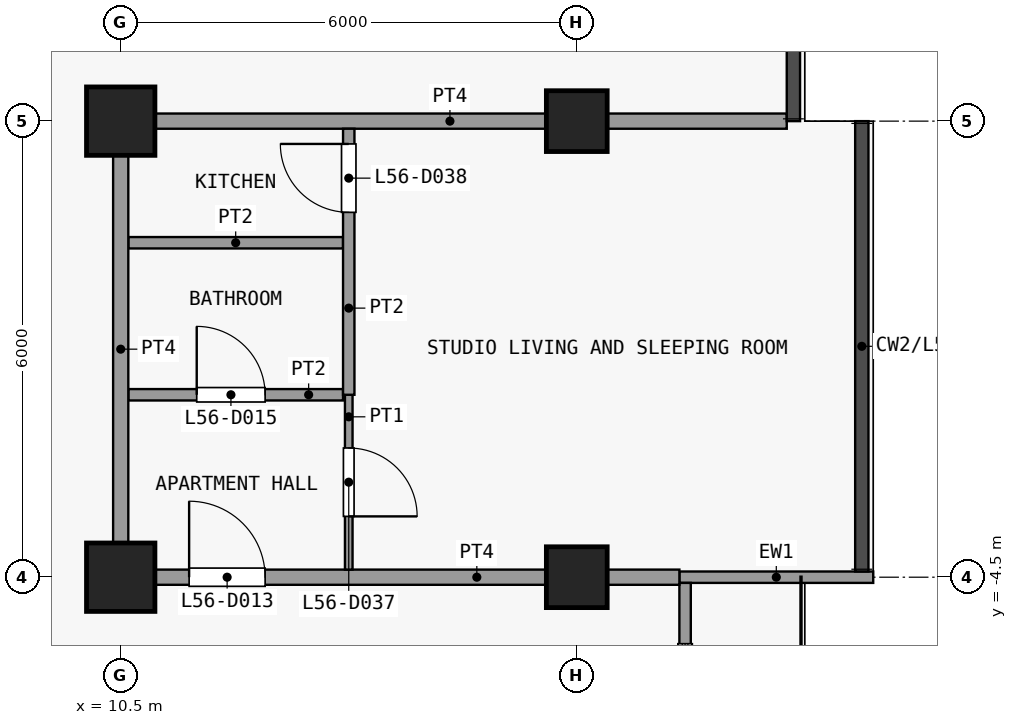
"""IFC4 building model, lengths in metres.
Left out: names, types, materials, properties, quantities, classifications, styles, units other than length and angle.
Written with IfcOpenShell. Run it as: python <this file> out.ifc"""

import sys

from ifc_helpers import new_model, si_unit, direction, frame, frame_2d, origin, origin_2d, place, context, subcontext, project, spatial, rectangle, extrude, element, fill, save


model = new_model("IFC4")
c1 = context("Model", 3, precision=1e-05, world=origin(), true_north=direction((0.0, 1.0)))
c2 = subcontext(c1, "Body", "Model", "MODEL_VIEW")
j1 = project(units=[si_unit("LENGTHUNIT", "METRE"), si_unit("PLANEANGLEUNIT", "RADIAN")], contexts=[c1])
p1 = place(None, origin())
s1 = spatial("IfcSite", under=j1, at=p1, CompositionType="ELEMENT")
p2 = place(p1, origin())
s2 = spatial("IfcBuilding", under=s1, at=p2, CompositionType="ELEMENT")
p3 = place(p2, frame((0.0, 0.0, 223.1)))
s3 = spatial("IfcBuildingStorey", under=s2, at=p3, CompositionType="ELEMENT", Elevation=223.1)
for number, where, z_axis, x_axis in (
    (1, (10.5, -4.5, 0.0), (0.0, 0.0, 1.0), (1.0, 0.0, 0.0)),
    (2, (10.5, 1.5, 0.0), (0.0, 0.0, 1.0), (1.0, 0.0, 0.0)),
):
    element("IfcColumn", number, at=place(p3, frame(where, z_axis=z_axis, x_axis=x_axis)), inside=s3, PredefinedType="COLUMN", context=c2, shape_type="SweptSolid", body=[
        extrude(rectangle(XDim=0.9, YDim=0.9, at=origin_2d()), origin(), (0.0, 0.0, 1.0), 3.6),
    ])
for number, where, z_axis, x_axis in (
    (3, (16.5, -4.5, 0.0), (0.0, 0.0, 1.0), (1.0, 0.0, 0.0)),
    (4, (16.5, 1.5, 0.0), (0.0, 0.0, 1.0), (1.0, 0.0, 0.0)),
):
    element("IfcColumn", number, at=place(p3, frame(where, z_axis=z_axis, x_axis=x_axis)), inside=s3, PredefinedType="COLUMN", context=c2, shape_type="SweptSolid", body=[
        extrude(rectangle(XDim=0.8, YDim=0.8, at=origin_2d()), origin(), (0.0, 0.0, 1.0), 3.6),
    ])
p4 = place(p3, frame((17.85, -4.5, 0.0), z_axis=(0.0, 0.0, 1.0), x_axis=(1.0, 0.0, 0.0)))
e5 = element("IfcWall", 5, at=p4, inside=s3, PredefinedType="SOLIDWALL", context=c2, shape_type="SweptSolid", body=[
    extrude(rectangle(XDim=2.55, YDim=0.15, at=frame_2d((1.275, 0.0))), origin(), (0.0, 0.0, 1.0), 3.3),
])
p5 = place(p3, frame((17.925, -4.575, 0.0), z_axis=(0.0, 0.0, 1.0), x_axis=(0.0, -1.0, 0.0)))
e6 = element("IfcWall", 6, at=p5, inside=s3, PredefinedType="SOLIDWALL", context=c2, shape_type="SweptSolid", body=[
    extrude(rectangle(XDim=8.85, YDim=0.15, at=frame_2d((4.425, 0.0))), origin(), (0.0, 0.0, 1.0), 3.3),
])
p6 = place(p5, frame((4.6, 0.0, 0.0)))
e7 = element("IfcOpeningElement", 7, at=p6, cuts=e6, PredefinedType="OPENING", context=c2, shape_type="SweptSolid", body=[
    extrude(rectangle(XDim=1.2, YDim=2.4, at=frame_2d((0.6, 1.2))), frame((0.0, 0.085, 0.0), z_axis=(0.0, -1.0, 0.0), x_axis=(1.0, 0.0, 0.0)), (0.0, 0.0, 1.0), 0.17),
])
p7 = place(p5, frame((6.55, 0.0, 0.9)))
e8 = element("IfcOpeningElement", 8, at=p7, cuts=e6, PredefinedType="OPENING", context=c2, shape_type="SweptSolid", body=[
    extrude(rectangle(XDim=2.05, YDim=2.1, at=frame_2d((1.025, 1.05))), frame((0.0, 0.085, 0.0), z_axis=(0.0, -1.0, 0.0), x_axis=(1.0, 0.0, 0.0)), (0.0, 0.0, 1.0), 0.17),
])
p8 = place(p5, frame((0.8, 0.0, 0.9)))
e9 = element("IfcOpeningElement", 9, at=p8, cuts=e6, PredefinedType="OPENING", context=c2, shape_type="SweptSolid", body=[
    extrude(rectangle(XDim=2.275, YDim=2.1, at=frame_2d((1.137, 1.05))), frame((0.0, 0.085, 0.0), z_axis=(0.0, -1.0, 0.0), x_axis=(1.0, 0.0, 0.0)), (0.0, 0.0, 1.0), 0.17),
])
p9 = place(p3, frame((10.4, -4.5, 0.0), z_axis=(0.0, 0.0, 1.0), x_axis=(1.0, 0.0, 0.0)))
e10 = element("IfcWall", 10, at=p9, inside=s3, PredefinedType="PARTITIONING", context=c2, shape_type="SweptSolid", body=[
    extrude(rectangle(XDim=7.45, YDim=0.2, at=frame_2d((3.725, 0.0))), origin(), (0.0, 0.0, 1.0), 3.3),
])
p10 = place(p9, frame((1.0, 0.0, 0.0)))
e11 = element("IfcOpeningElement", 11, at=p10, cuts=e10, PredefinedType="OPENING", context=c2, shape_type="SweptSolid", body=[
    extrude(rectangle(XDim=1.0, YDim=2.1, at=frame_2d((0.5, 1.05))), frame((0.0, 0.11, 0.0), z_axis=(0.0, -1.0, 0.0), x_axis=(1.0, 0.0, 0.0)), (0.0, 0.0, 1.0), 0.22),
])
p11 = place(p3, frame((10.6, -2.1, 0.0), z_axis=(0.0, 0.0, 1.0), x_axis=(1.0, 0.0, 0.0)))
e12 = element("IfcWall", 12, at=p11, inside=s3, PredefinedType="PARTITIONING", context=c2, shape_type="SweptSolid", body=[
    extrude(rectangle(XDim=2.825, YDim=0.15, at=frame_2d((1.413, 0.0))), origin(), (0.0, 0.0, 1.0), 3.3),
])
p12 = place(p11, frame((0.9, 0.0, 0.0)))
e13 = element("IfcOpeningElement", 13, at=p12, cuts=e12, PredefinedType="OPENING", context=c2, shape_type="SweptSolid", body=[
    extrude(rectangle(XDim=0.9, YDim=2.1, at=frame_2d((0.45, 1.05))), frame((0.0, 0.085, 0.0), z_axis=(0.0, -1.0, 0.0), x_axis=(1.0, 0.0, 0.0)), (0.0, 0.0, 1.0), 0.17),
])
p13 = place(p3, frame((10.6, -0.1, 0.0), z_axis=(0.0, 0.0, 1.0), x_axis=(1.0, 0.0, 0.0)))
e14 = element("IfcWall", 14, at=p13, inside=s3, PredefinedType="PARTITIONING", context=c2, shape_type="SweptSolid", body=[
    extrude(rectangle(XDim=2.825, YDim=0.15, at=frame_2d((1.413, 0.0))), origin(), (0.0, 0.0, 1.0), 3.3),
])
p14 = place(p3, frame((10.4, 1.5, 0.0), z_axis=(0.0, 0.0, 1.0), x_axis=(1.0, 0.0, 0.0)))
e15 = element("IfcWall", 15, at=p14, inside=s3, PredefinedType="PARTITIONING", context=c2, shape_type="SweptSolid", body=[
    extrude(rectangle(XDim=8.863, YDim=0.2, at=frame_2d((4.431, 0.0))), origin(), (0.0, 0.0, 1.0), 3.3),
])
p15 = place(p3, frame((10.5, -4.4, 0.0), z_axis=(0.0, 0.0, 1.0), x_axis=(0.0, 1.0, 0.0)))
e16 = element("IfcWall", 16, at=p15, inside=s3, PredefinedType="PARTITIONING", context=c2, shape_type="SweptSolid", body=[
    extrude(rectangle(XDim=5.8, YDim=0.2, at=frame_2d((2.9, 0.0))), origin(), (0.0, 0.0, 1.0), 3.3),
])
p16 = place(p3, frame((13.5, -4.4, 0.0), z_axis=(0.0, 0.0, 1.0), x_axis=(0.0, 1.0, 0.0)))
e17 = element("IfcWall", 17, at=p16, inside=s3, PredefinedType="PARTITIONING", context=c2, shape_type="SweptSolid", body=[
    extrude(rectangle(XDim=2.3, YDim=0.1, at=frame_2d((1.15, 0.0))), origin(), (0.0, 0.0, 1.0), 3.3),
])
p17 = place(p16, frame((0.7, 0.0, 0.0)))
e18 = element("IfcOpeningElement", 18, at=p17, cuts=e17, PredefinedType="OPENING", context=c2, shape_type="SweptSolid", body=[
    extrude(rectangle(XDim=0.9, YDim=2.1, at=frame_2d((0.45, 1.05))), frame((0.0, 0.06, 0.0), z_axis=(0.0, -1.0, 0.0), x_axis=(1.0, 0.0, 0.0)), (0.0, 0.0, 1.0), 0.12),
])
p18 = place(p3, frame((13.5, -2.1, 0.0), z_axis=(0.0, 0.0, 1.0), x_axis=(0.0, 1.0, 0.0)))
e19 = element("IfcWall", 19, at=p18, inside=s3, PredefinedType="PARTITIONING", context=c2, shape_type="SweptSolid", body=[
    extrude(rectangle(XDim=3.5, YDim=0.15, at=frame_2d((1.75, 0.0))), origin(), (0.0, 0.0, 1.0), 3.3),
])
p19 = place(p18, frame((2.4, 0.0, 0.0)))
e20 = element("IfcOpeningElement", 20, at=p19, cuts=e19, PredefinedType="OPENING", context=c2, shape_type="SweptSolid", body=[
    extrude(rectangle(XDim=0.9, YDim=2.1, at=frame_2d((0.45, 1.05))), frame((0.0, 0.085, 0.0), z_axis=(0.0, -1.0, 0.0), x_axis=(1.0, 0.0, 0.0)), (0.0, 0.0, 1.0), 0.17),
])
p20 = place(p8, origin())
e21 = element("IfcWindow", 21, at=p20, inside=s3, PartitioningType="SINGLE_PANEL", PredefinedType="WINDOW", context=c2, shape_type="SweptSolid", body=[
    extrude(rectangle(XDim=2.275, YDim=2.1, at=frame_2d((1.137, 1.05))), frame((0.0, 0.03, 0.0), z_axis=(0.0, -1.0, 0.0), x_axis=(1.0, 0.0, 0.0)), (0.0, 0.0, 1.0), 0.06),
])
fill(e9, e21)
p21 = place(p10, origin())
e22 = element("IfcDoor", 22, at=p21, inside=s3, OperationType="SINGLE_SWING_RIGHT", PredefinedType="DOOR", context=c2, shape_type="SweptSolid", body=[
    extrude(rectangle(XDim=1.0, YDim=2.1, at=frame_2d((0.5, 1.05))), frame((0.0, 0.025, 0.0), z_axis=(0.0, -1.0, 0.0), x_axis=(1.0, 0.0, 0.0)), (0.0, 0.0, 1.0), 0.05),
])
fill(e11, e22)
p22 = place(p12, origin())
e23 = element("IfcDoor", 23, at=p22, inside=s3, OperationType="SINGLE_SWING_RIGHT", PredefinedType="DOOR", context=c2, shape_type="SweptSolid", body=[
    extrude(rectangle(XDim=0.9, YDim=2.1, at=frame_2d((0.45, 1.05))), frame((0.0, 0.025, 0.0), z_axis=(0.0, -1.0, 0.0), x_axis=(1.0, 0.0, 0.0)), (0.0, 0.0, 1.0), 0.05),
])
fill(e13, e23)
p23 = place(p17, origin())
e24 = element("IfcDoor", 24, at=p23, inside=s3, OperationType="SINGLE_SWING_LEFT", PredefinedType="DOOR", context=c2, shape_type="SweptSolid", body=[
    extrude(rectangle(XDim=0.9, YDim=2.1, at=frame_2d((0.45, 1.05))), frame((0.0, 0.025, 0.0), z_axis=(0.0, -1.0, 0.0), x_axis=(1.0, 0.0, 0.0)), (0.0, 0.0, 1.0), 0.05),
])
fill(e18, e24)
p24 = place(p19, origin())
e25 = element("IfcDoor", 25, at=p24, inside=s3, OperationType="SINGLE_SWING_LEFT", PredefinedType="DOOR", context=c2, shape_type="SweptSolid", body=[
    extrude(rectangle(XDim=0.9, YDim=2.1, at=frame_2d((0.45, 1.05))), frame((0.0, 0.025, 0.0), z_axis=(0.0, -1.0, 0.0), x_axis=(1.0, 0.0, 0.0)), (0.0, 0.0, 1.0), 0.05),
])
fill(e20, e25)
save(model, sys.argv[1])
